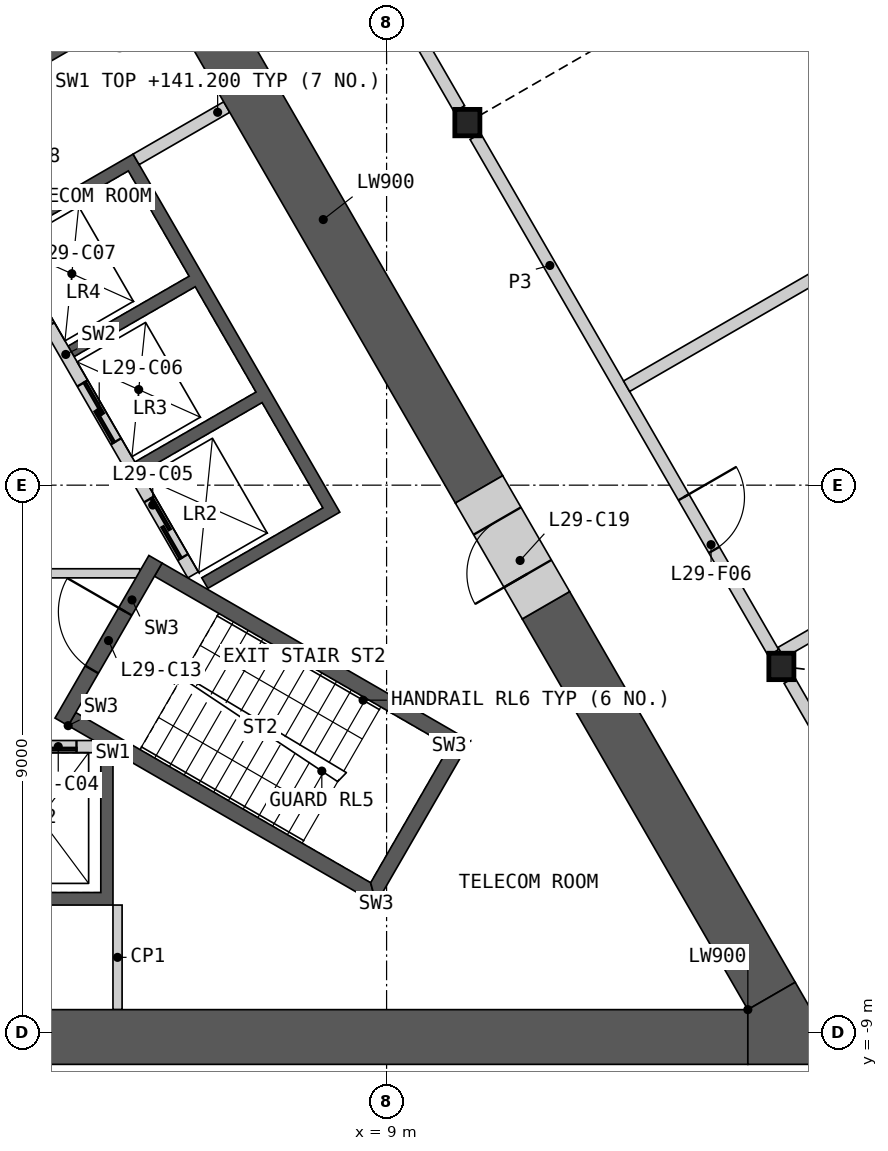
"""IFC4 building model, lengths in metres.
Left out: names, types, materials, properties, quantities, classifications, styles, units other than length and angle.
Written with IfcOpenShell. Run it as: python <this file> out.ifc"""

import sys

from ifc_helpers import new_model, si_unit, direction, frame, frame_2d, origin, origin_2d, place, context, subcontext, project, spatial, polyline, rectangle, i_section, outline, extrude, element, fill, save


model = new_model("IFC4")
c1 = context("Model", 3, precision=1e-05, world=origin(), true_north=direction((0.0, 1.0)))
c2 = subcontext(c1, "Body", "Model", "MODEL_VIEW")
j1 = project(units=[si_unit("LENGTHUNIT", "METRE"), si_unit("PLANEANGLEUNIT", "RADIAN")], contexts=[c1])
p1 = place(None, origin())
s1 = spatial("IfcSite", under=j1, at=p1, CompositionType="ELEMENT")
p2 = place(p1, origin())
s2 = spatial("IfcBuilding", under=s1, at=p2, CompositionType="ELEMENT")
p3 = place(p2, frame((0.0, 0.0, 137.4)))
s3 = spatial("IfcBuildingStorey", under=s2, at=p3, CompositionType="ELEMENT", Elevation=137.4)
for number, where, z_axis, x_axis in (
    (1, (15.493, -2.982, 0.0), (0.0, 0.0, 1.0), (1.0, 0.0, 0.0)),
    (2, (10.328, 5.963, 0.0), (0.0, 0.0, 1.0), (1.0, 0.0, 0.0)),
):
    element("IfcColumn", number, at=place(p3, frame(where, z_axis=z_axis, x_axis=x_axis)), inside=s3, PredefinedType="COLUMN", context=c2, shape_type="SweptSolid", body=[
        extrude(i_section(OverallWidth=0.412, OverallDepth=0.435, WebThickness=0.036, FlangeThickness=0.057, at=origin_2d()), origin(), (0.0, 0.0, 1.0), 4.2),
    ])
p4 = place(p3, origin())
e3 = element("IfcWall", 3, at=p4, inside=s3, PredefinedType="SHEAR", context=c2, shape_type="SweptSolid", body=[
    extrude(outline(polyline([(4.5, -4.4), (4.5, -6.906), (-4.5, -6.906), (-4.5, -4.4), (-4.3, -4.4), (-4.3, -6.7), (-2.3, -6.7), (-2.3, -4.4), (-2.1, -4.4), (-2.1, -6.7), (-0.1, -6.7), (-0.1, -4.4), (0.1, -4.4), (0.1, -6.7), (2.1, -6.7), (2.1, -4.4), (2.3, -4.4), (2.3, -6.7), (4.3, -6.7), (4.3, -4.4), (4.5, -4.4)])), origin(), (0.0, 0.0, 1.0), 3.8),
])
p5 = place(p3, frame((-4.187, -4.3, 0.0), z_axis=(0.0, 0.0, 1.0), x_axis=(1.0, 0.0, 0.0)))
e4 = element("IfcWall", 4, at=p5, inside=s3, PredefinedType="SOLIDWALL", context=c2, shape_type="SweptSolid", body=[
    extrude(rectangle(XDim=8.373, YDim=0.2, at=frame_2d((4.187, 0.0))), origin(), (0.0, 0.0, 1.0), 3.8),
])
p6 = place(p5, frame((0.287, 0.0, 0.0)))
e5 = element("IfcOpeningElement", 5, at=p6, cuts=e4, PredefinedType="OPENING", context=c2, shape_type="SweptSolid", body=[
    extrude(rectangle(XDim=1.2, YDim=2.1, at=frame_2d((0.6, 1.05))), frame((0.0, 0.11, 0.0), z_axis=(0.0, -1.0, 0.0), x_axis=(1.0, 0.0, 0.0)), (0.0, 0.0, 1.0), 0.22),
])
p7 = place(p5, frame((2.387, 0.0, 0.0)))
e6 = element("IfcOpeningElement", 6, at=p7, cuts=e4, PredefinedType="OPENING", context=c2, shape_type="SweptSolid", body=[
    extrude(rectangle(XDim=1.4, YDim=2.1, at=frame_2d((0.7, 1.05))), frame((0.0, 0.11, 0.0), z_axis=(0.0, -1.0, 0.0), x_axis=(1.0, 0.0, 0.0)), (0.0, 0.0, 1.0), 0.22),
])
p8 = place(p5, frame((4.737, 0.0, 0.0)))
e7 = element("IfcOpeningElement", 7, at=p8, cuts=e4, PredefinedType="OPENING", context=c2, shape_type="SweptSolid", body=[
    extrude(rectangle(XDim=1.1, YDim=2.1, at=frame_2d((0.55, 1.05))), frame((0.0, 0.11, 0.0), z_axis=(0.0, -1.0, 0.0), x_axis=(1.0, 0.0, 0.0)), (0.0, 0.0, 1.0), 0.22),
])
p9 = place(p5, frame((6.887, 0.0, 0.0)))
e8 = element("IfcOpeningElement", 8, at=p9, cuts=e4, PredefinedType="OPENING", context=c2, shape_type="SweptSolid", body=[
    extrude(rectangle(XDim=1.2, YDim=2.1, at=frame_2d((0.6, 1.05))), frame((0.0, 0.11, 0.0), z_axis=(0.0, -1.0, 0.0), x_axis=(1.0, 0.0, 0.0)), (0.0, 0.0, 1.0), 0.22),
])
p10 = place(p3, origin())
e9 = element("IfcWall", 9, at=p10, inside=s3, PredefinedType="SHEAR", context=c2, shape_type="SweptSolid", body=[
    extrude(outline(polyline([(1.561, 6.097), (3.731, 7.35), (3.831, 7.177), (1.66, 5.924), (1.561, 6.097)])), origin(), (0.0, 0.0, 1.0), 3.8),
])
p11 = place(p3, origin())
e10 = element("IfcWall", 10, at=p11, inside=s3, PredefinedType="SHEAR", context=c2, shape_type="SweptSolid", body=[
    extrude(outline(polyline([(2.66, 4.192), (4.831, 5.445), (8.231, -0.444), (6.061, -1.697), (5.96, -1.524), (7.952, -0.374), (6.952, 1.358), (4.96, 0.208), (4.861, 0.381), (6.852, 1.531), (5.852, 3.263), (3.861, 2.113), (3.76, 2.287), (5.752, 3.437), (4.752, 5.169), (2.76, 4.019), (2.66, 4.192)])), origin(), (0.0, 0.0, 1.0), 3.8),
])
p12 = place(p3, frame((5.817, -1.476, 0.0), z_axis=(0.0, 0.0, 1.0), x_axis=(-0.500002616675, 0.866023893041, 0.0)))
e11 = element("IfcWall", 11, at=p12, inside=s3, PredefinedType="SOLIDWALL", context=c2, shape_type="SweptSolid", body=[
    extrude(rectangle(XDim=8.373, YDim=0.2, at=frame_2d((4.187, 0.0))), origin(), (0.0, 0.0, 1.0), 3.8),
])
p13 = place(p12, frame((0.337, 0.0, 0.0)))
e12 = element("IfcOpeningElement", 12, at=p13, cuts=e11, PredefinedType="OPENING", context=c2, shape_type="SweptSolid", body=[
    extrude(rectangle(XDim=1.1, YDim=2.1, at=frame_2d((0.55, 1.05))), frame((0.0, 0.11, 0.0), z_axis=(0.0, -1.0, 0.0), x_axis=(1.0, 0.0, 0.0)), (0.0, 0.0, 1.0), 0.22),
])
p14 = place(p12, frame((2.537, 0.0, 0.0)))
e13 = element("IfcOpeningElement", 13, at=p14, cuts=e11, PredefinedType="OPENING", context=c2, shape_type="SweptSolid", body=[
    extrude(rectangle(XDim=1.1, YDim=2.1, at=frame_2d((0.55, 1.05))), frame((0.0, 0.11, 0.0), z_axis=(0.0, -1.0, 0.0), x_axis=(1.0, 0.0, 0.0)), (0.0, 0.0, 1.0), 0.22),
])
p15 = place(p12, frame((4.737, 0.0, 0.0)))
e14 = element("IfcOpeningElement", 14, at=p15, cuts=e11, PredefinedType="OPENING", context=c2, shape_type="SweptSolid", body=[
    extrude(rectangle(XDim=1.1, YDim=2.1, at=frame_2d((0.55, 1.05))), frame((0.0, 0.11, 0.0), z_axis=(0.0, -1.0, 0.0), x_axis=(1.0, 0.0, 0.0)), (0.0, 0.0, 1.0), 0.22),
])
p16 = place(p12, frame((7.037, 0.0, 0.0)))
e15 = element("IfcOpeningElement", 15, at=p16, cuts=e11, PredefinedType="OPENING", context=c2, shape_type="SweptSolid", body=[
    extrude(rectangle(XDim=0.9, YDim=2.1, at=frame_2d((0.45, 1.05))), frame((0.0, 0.11, 0.0), z_axis=(0.0, -1.0, 0.0), x_axis=(1.0, 0.0, 0.0)), (0.0, 0.0, 1.0), 0.22),
])
p17 = place(p3, frame((4.881, 5.358, 0.0), z_axis=(0.0, 0.0, 1.0), x_axis=(0.866024871741, 0.500000921525, 0.0)))
e16 = element("IfcWall", 16, at=p17, inside=s3, PredefinedType="SHEAR", context=c2, shape_type="SweptSolid", body=[
    extrude(rectangle(XDim=1.72, YDim=0.2, at=frame_2d((0.86, 0.0))), origin(), (0.0, 0.0, 1.0), 3.8),
])
p18 = place(p3, frame((-4.941, -1.45, 0.0), z_axis=(0.0, 0.0, 1.0), x_axis=(1.0, 0.0, 0.0)))
e17 = element("IfcWall", 17, at=p18, inside=s3, PredefinedType="PARTITIONING", context=c2, shape_type="SweptSolid", body=[
    extrude(rectangle(XDim=9.882, YDim=0.15, at=frame_2d((4.941, 0.0))), origin(), (0.0, 0.0, 1.0), 3.8),
])
p19 = place(p18, frame((4.391, 0.0, 0.0)))
e18 = element("IfcOpeningElement", 18, at=p19, cuts=e17, PredefinedType="OPENING", context=c2, shape_type="SweptSolid", body=[
    extrude(rectangle(XDim=1.1, YDim=2.1, at=frame_2d((0.55, 1.05))), frame((0.0, 0.085, 0.0), z_axis=(0.0, -1.0, 0.0), x_axis=(1.0, 0.0, 0.0)), (0.0, 0.0, 1.0), 0.17),
])
p20 = place(p3, origin())
e19 = element("IfcWall", 19, at=p20, inside=s3, PredefinedType="SHEAR", context=c2, shape_type="SweptSolid", body=[
    extrude(outline(polyline([(3.763, -3.956), (8.83, -6.881), (8.738, -6.539), (3.888, -3.739), (3.763, -3.956)])), origin(), (0.0, 0.0, 1.0), 3.8),
])
p21 = place(p3, origin())
e20 = element("IfcWall", 20, at=p21, inside=s3, PredefinedType="SHEAR", context=c2, shape_type="SweptSolid", body=[
    extrude(outline(polyline([(8.83, -6.881), (10.374, -4.206), (10.032, -4.298), (8.738, -6.539), (8.83, -6.881)])), origin(), (0.0, 0.0, 1.0), 3.8),
])
p22 = place(p3, origin())
e21 = element("IfcWall", 21, at=p22, inside=s3, PredefinedType="SHEAR", context=c2, shape_type="SweptSolid", body=[
    extrude(outline(polyline([(10.032, -4.298), (10.374, -4.206), (5.307, -1.281), (5.182, -1.498), (10.032, -4.298)])), origin(), (0.0, 0.0, 1.0), 3.8),
])
p23 = place(p3, frame((3.655, -3.893, 0.0), z_axis=(0.0, 0.0, 1.0), x_axis=(0.499982516597, 0.866035497597, 0.0)))
e22 = element("IfcWall", 22, at=p23, inside=s3, PredefinedType="SHEAR", context=c2, shape_type="SweptSolid", body=[
    extrude(rectangle(XDim=3.088, YDim=0.25, at=frame_2d((1.544, 0.0))), origin(), (0.0, 0.0, 1.0), 3.8),
])
p24 = place(p23, frame((0.994, 0.0, 0.0)))
e23 = element("IfcOpeningElement", 23, at=p24, cuts=e22, PredefinedType="OPENING", context=c2, shape_type="SweptSolid", body=[
    extrude(rectangle(XDim=1.1, YDim=2.1, at=frame_2d((0.55, 1.05))), frame((0.0, 0.135, 0.0), z_axis=(0.0, -1.0, 0.0), x_axis=(1.0, 0.0, 0.0)), (0.0, 0.0, 1.0), 0.27),
])
p25 = place(p3, frame((4.575, -6.906, 0.0), z_axis=(0.0, 0.0, 1.0), x_axis=(0.0, -1.0, 0.0)))
e24 = element("IfcWall", 24, at=p25, inside=s3, PredefinedType="PARTITIONING", context=c2, shape_type="SweptSolid", body=[
    extrude(rectangle(XDim=1.72, YDim=0.15, at=frame_2d((0.86, 0.0))), origin(), (0.0, 0.0, 1.0), 3.8),
])
p26 = place(p3, frame((2.488, -9.076, 0.0), z_axis=(0.0, 0.0, 1.0), x_axis=(1.0, 0.0, 0.0)))
e25 = element("IfcWall", 25, at=p26, inside=s3, PredefinedType="SHEAR", context=c2, shape_type="SweptSolid", body=[
    extrude(rectangle(XDim=12.454, YDim=0.9, at=frame_2d((6.227, 0.0))), origin(), (0.0, 0.0, 1.0), 3.8),
])
p27 = place(p3, frame((10.521, -0.07, 0.0), z_axis=(0.0, 0.0, 1.0), x_axis=(-0.499997384719, 0.866026913713, 0.0)))
e26 = element("IfcWall", 26, at=p27, inside=s3, PredefinedType="SHEAR", context=c2, shape_type="SweptSolid", body=[
    extrude(rectangle(XDim=10.249, YDim=0.9, at=frame_2d((5.125, 0.0))), origin(), (0.0, 0.0, 1.0), 3.8),
])
p28 = place(p3, frame((15.331, -8.401, 0.0), z_axis=(0.0, 0.0, 1.0), x_axis=(-0.499985413531, 0.866033825122, 0.0)))
e27 = element("IfcWall", 27, at=p28, inside=s3, PredefinedType="SHEAR", context=c2, shape_type="SweptSolid", body=[
    extrude(rectangle(XDim=7.421, YDim=0.9, at=frame_2d((3.71, 0.0))), origin(), (0.0, 0.0, 1.0), 3.8),
])
p29 = place(p3, origin())
e28 = element("IfcWall", 28, at=p29, inside=s3, PredefinedType="SHEAR", context=c2, shape_type="SweptSolid", body=[
    extrude(outline(polyline([(14.941, -8.626), (15.721, -8.176), (16.5, -9.526), (14.941, -9.526), (14.941, -8.626)])), origin(), (0.0, 0.0, 1.0), 3.8),
])
p30 = place(p3, frame((11.621, -1.975, 0.0), z_axis=(0.0, 0.0, 1.0), x_axis=(-0.50002983664, 0.866008176907, 0.0)))
e29 = element("IfcWall", 29, at=p30, inside=s3, PredefinedType="SHEAR", context=c2, shape_type="SweptSolid", body=[
    extrude(rectangle(XDim=2.2, YDim=0.9, at=frame_2d((1.1, 0.0))), origin(), (0.0, 0.0, 1.0), 3.8),
])
p31 = place(p30, frame((0.6, 0.0, 0.0)))
e30 = element("IfcOpeningElement", 30, at=p31, cuts=e29, PredefinedType="OPENING", context=c2, shape_type="SweptSolid", body=[
    extrude(rectangle(XDim=1.0, YDim=2.1, at=frame_2d((0.5, 1.05))), frame((0.0, 0.46, 0.0), z_axis=(0.0, -1.0, 0.0), x_axis=(1.0, 0.0, 0.0)), (0.0, 0.0, 1.0), 0.92),
])
p32 = place(p3, frame((10.46, 5.736, 0.0), z_axis=(0.0, 0.0, 1.0), x_axis=(0.500004141693, -0.866023012564, 0.0)))
e31 = element("IfcWall", 31, at=p32, inside=s3, PredefinedType="PARTITIONING", context=c2, shape_type="SweptSolid", body=[
    extrude(rectangle(XDim=9.803, YDim=0.2, at=frame_2d((4.902, 0.0))), origin(), (0.0, 0.0, 1.0), 3.8),
])
p33 = place(p32, frame((6.853, 0.0, 0.0)))
e32 = element("IfcOpeningElement", 32, at=p33, cuts=e31, PredefinedType="OPENING", context=c2, shape_type="SweptSolid", body=[
    extrude(rectangle(XDim=1.0, YDim=2.1, at=frame_2d((0.5, 1.05))), frame((0.0, 0.11, 0.0), z_axis=(0.0, -1.0, 0.0), x_axis=(1.0, 0.0, 0.0)), (0.0, 0.0, 1.0), 0.22),
])
p34 = place(p3, frame((5.295, 14.68, 0.0), z_axis=(0.0, 0.0, 1.0), x_axis=(0.500012035596, -0.866018454918, 0.0)))
e33 = element("IfcWall", 33, at=p34, inside=s3, PredefinedType="PARTITIONING", context=c2, shape_type="SweptSolid", body=[
    extrude(rectangle(XDim=9.803, YDim=0.2, at=frame_2d((4.902, 0.0))), origin(), (0.0, 0.0, 1.0), 3.8),
])
p35 = place(p34, frame((4.052, 0.0, 0.0)))
e34 = element("IfcOpeningElement", 34, at=p35, cuts=e33, PredefinedType="OPENING", context=c2, shape_type="SweptSolid", body=[
    extrude(rectangle(XDim=1.8, YDim=2.1, at=frame_2d((0.9, 1.05))), frame((0.0, 0.11, 0.0), z_axis=(0.0, -1.0, 0.0), x_axis=(1.0, 0.0, 0.0)), (0.0, 0.0, 1.0), 0.22),
])
p36 = place(p3, frame((15.624, -3.209, 0.0), z_axis=(0.0, 0.0, 1.0), x_axis=(0.499997920671, -0.866026604282, 0.0)))
e35 = element("IfcWall", 35, at=p36, inside=s3, PredefinedType="PARTITIONING", context=c2, shape_type="SweptSolid", body=[
    extrude(rectangle(XDim=6.24, YDim=0.2, at=frame_2d((3.12, 0.0))), origin(), (0.0, 0.0, 1.0), 3.8),
])
p37 = place(p36, frame((2.57, 0.0, 0.0)))
e36 = element("IfcOpeningElement", 36, at=p37, cuts=e35, PredefinedType="OPENING", context=c2, shape_type="SweptSolid", body=[
    extrude(rectangle(XDim=1.0, YDim=2.1, at=frame_2d((0.5, 1.05))), frame((0.0, 0.11, 0.0), z_axis=(0.0, -1.0, 0.0), x_axis=(1.0, 0.0, 0.0)), (0.0, 0.0, 1.0), 0.22),
])
p38 = place(p3, frame((15.488, -2.754, 0.0), z_axis=(0.0, 0.0, 1.0), x_axis=(0.866026411352, 0.499998254837, 0.0)))
e37 = element("IfcWall", 37, at=p38, inside=s3, PredefinedType="PARTITIONING", context=c2, shape_type="SweptSolid", body=[
    extrude(rectangle(XDim=12.873, YDim=0.2, at=frame_2d((6.437, 0.0))), origin(), (0.0, 0.0, 1.0), 2.885),
])
p39 = place(p3, frame((12.947, 1.627, 0.0), z_axis=(0.0, 0.0, 1.0), x_axis=(0.866034669089, 0.499983951678, 0.0)))
e38 = element("IfcWall", 38, at=p39, inside=s3, PredefinedType="PARTITIONING", context=c2, shape_type="SweptSolid", body=[
    extrude(rectangle(XDim=8.27, YDim=0.2, at=frame_2d((4.135, 0.0))), origin(), (0.0, 0.0, 1.0), 2.885),
])
p40 = place(p9, origin())
e39 = element("IfcDoor", 39, at=p40, inside=s3, OperationType="SLIDING_TO_LEFT", PredefinedType="DOOR", context=c2, shape_type="SweptSolid", body=[
    extrude(rectangle(XDim=1.2, YDim=2.1, at=frame_2d((0.6, 1.05))), frame((0.0, 0.025, 0.0), z_axis=(0.0, -1.0, 0.0), x_axis=(1.0, 0.0, 0.0)), (0.0, 0.0, 1.0), 0.05),
])
fill(e8, e39)
p41 = place(p13, origin())
e40 = element("IfcDoor", 40, at=p41, inside=s3, OperationType="SLIDING_TO_LEFT", PredefinedType="DOOR", context=c2, shape_type="SweptSolid", body=[
    extrude(rectangle(XDim=1.1, YDim=2.1, at=frame_2d((0.55, 1.05))), frame((0.0, 0.025, 0.0), z_axis=(0.0, -1.0, 0.0), x_axis=(1.0, 0.0, 0.0)), (0.0, 0.0, 1.0), 0.05),
])
fill(e12, e40)
p42 = place(p14, origin())
e41 = element("IfcDoor", 41, at=p42, inside=s3, OperationType="SLIDING_TO_LEFT", PredefinedType="DOOR", context=c2, shape_type="SweptSolid", body=[
    extrude(rectangle(XDim=1.1, YDim=2.1, at=frame_2d((0.55, 1.05))), frame((0.0, 0.025, 0.0), z_axis=(0.0, -1.0, 0.0), x_axis=(1.0, 0.0, 0.0)), (0.0, 0.0, 1.0), 0.05),
])
fill(e13, e41)
p43 = place(p24, origin())
e42 = element("IfcDoor", 42, at=p43, inside=s3, OperationType="SINGLE_SWING_RIGHT", PredefinedType="DOOR", context=c2, shape_type="SweptSolid", body=[
    extrude(rectangle(XDim=1.1, YDim=2.1, at=frame_2d((0.55, 1.05))), frame((0.0, 0.025, 0.0), z_axis=(0.0, -1.0, 0.0), x_axis=(1.0, 0.0, 0.0)), (0.0, 0.0, 1.0), 0.05),
])
fill(e23, e42)
p44 = place(p31, origin())
e43 = element("IfcDoor", 43, at=p44, inside=s3, OperationType="SINGLE_SWING_LEFT", PredefinedType="DOOR", context=c2, shape_type="SweptSolid", body=[
    extrude(rectangle(XDim=1.0, YDim=2.1, at=frame_2d((0.5, 1.05))), frame((0.0, 0.205, 0.0), z_axis=(0.0, -1.0, 0.0), x_axis=(1.0, 0.0, 0.0)), (0.0, 0.0, 1.0), 0.05),
])
fill(e30, e43)
p45 = place(p33, origin())
e44 = element("IfcDoor", 44, at=p45, inside=s3, OperationType="SINGLE_SWING_LEFT", PredefinedType="DOOR", context=c2, shape_type="SweptSolid", body=[
    extrude(rectangle(XDim=1.0, YDim=2.1, at=frame_2d((0.5, 1.05))), frame((0.0, 0.025, 0.0), z_axis=(0.0, -1.0, 0.0), x_axis=(1.0, 0.0, 0.0)), (0.0, 0.0, 1.0), 0.05),
])
fill(e32, e44)
save(model, sys.argv[1])
